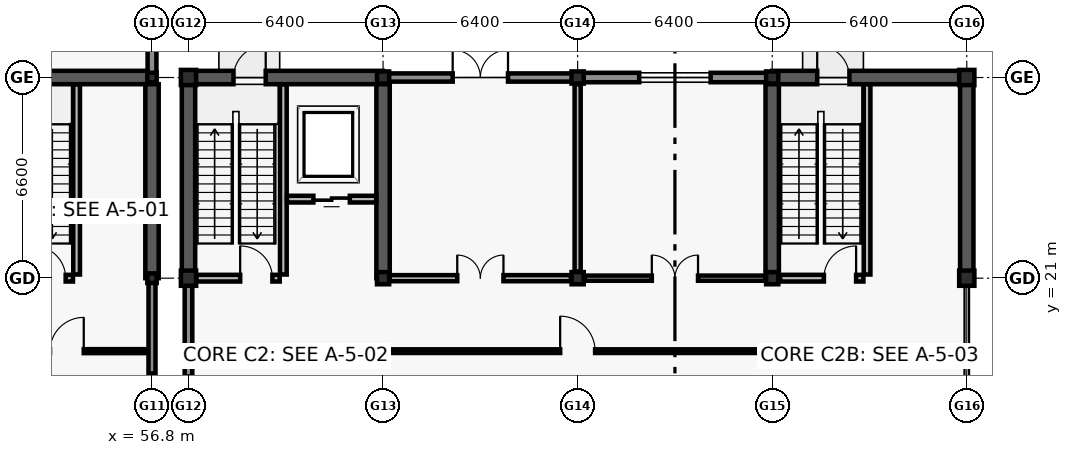
"""IFC4 building model, lengths in metres.
Left out: names, types, materials, properties, quantities, classifications, styles, units other than length and angle.
Written with IfcOpenShell. Run it as: python <this file> out.ifc"""

import sys

from ifc_helpers import new_model, si_unit, direction, frame, frame_2d, origin, origin_2d, place, context, subcontext, project, spatial, rectangle, i_section, extrude, element, fill, save


model = new_model("IFC4")
c1 = context("Model", 3, precision=1e-05, world=origin(), true_north=direction((0.0, 1.0)))
c2 = subcontext(c1, "Body", "Model", "MODEL_VIEW")
j1 = project(units=[si_unit("LENGTHUNIT", "METRE"), si_unit("PLANEANGLEUNIT", "RADIAN")], contexts=[c1])
p1 = place(None, origin())
s1 = spatial("IfcSite", under=j1, at=p1, CompositionType="ELEMENT")
p2 = place(p1, origin())
s2 = spatial("IfcBuilding", under=s1, at=p2, CompositionType="ELEMENT")
p3 = place(p2, origin())
s3 = spatial("IfcBuildingStorey", under=s2, at=p3, CompositionType="ELEMENT", Elevation=0.0)
for number, where, z_axis, x_axis in (
    (1, (56.8, 21.0, 0.0), (0.0, 0.0, 1.0), (1.0, 0.0, 0.0)),
    (2, (56.8, 27.6, 0.0), (0.0, 0.0, 1.0), (1.0, 0.0, 0.0)),
):
    element("IfcColumn", number, at=place(p3, frame(where, z_axis=z_axis, x_axis=x_axis)), inside=s3, PredefinedType="COLUMN", context=c2, shape_type="SweptSolid", body=[
        extrude(i_section(OverallWidth=0.307, OverallDepth=0.315, WebThickness=0.012, FlangeThickness=0.019, FilletRadius=0.017, at=origin_2d()), origin(), (0.0, 0.0, 1.0), 5.4),
    ])
for number, where, z_axis, x_axis in (
    (3, (58.0, 21.0, 0.0), (0.0, 0.0, 1.0), (1.0, 0.0, 0.0)),
    (4, (58.0, 27.6, 0.0), (0.0, 0.0, 1.0), (1.0, 0.0, 0.0)),
):
    element("IfcColumn", number, at=place(p3, frame(where, z_axis=z_axis, x_axis=x_axis)), inside=s3, PredefinedType="COLUMN", context=c2, shape_type="SweptSolid", body=[
        extrude(i_section(OverallWidth=0.5, OverallDepth=0.5, WebThickness=0.02, FlangeThickness=0.036, at=origin_2d()), origin(), (0.0, 0.0, 1.0), 5.4),
    ])
for number, where, z_axis, x_axis in (
    (5, (64.4, 21.0, 0.0), (0.0, 0.0, 1.0), (1.0, 0.0, 0.0)),
    (6, (64.4, 27.6, 0.0), (0.0, 0.0, 1.0), (1.0, 0.0, 0.0)),
    (7, (70.8, 21.0, 0.0), (0.0, 0.0, 1.0), (1.0, 0.0, 0.0)),
    (8, (70.8, 27.6, 0.0), (0.0, 0.0, 1.0), (1.0, 0.0, 0.0)),
    (9, (77.2, 21.0, 0.0), (0.0, 0.0, 1.0), (1.0, 0.0, 0.0)),
    (10, (77.2, 27.6, 0.0), (0.0, 0.0, 1.0), (1.0, 0.0, 0.0)),
):
    element("IfcColumn", number, at=place(p3, frame(where, z_axis=z_axis, x_axis=x_axis)), inside=s3, PredefinedType="COLUMN", context=c2, shape_type="SweptSolid", body=[
        extrude(i_section(OverallWidth=0.4, OverallDepth=0.4, WebThickness=0.02, FlangeThickness=0.032, at=origin_2d()), origin(), (0.0, 0.0, 1.0), 5.4),
    ])
for number, where, z_axis, x_axis in (
    (11, (83.6, 21.0, 0.0), (0.0, 0.0, 1.0), (1.0, 0.0, 0.0)),
    (12, (83.6, 27.6, 0.0), (0.0, 0.0, 1.0), (1.0, 0.0, 0.0)),
):
    element("IfcColumn", number, at=place(p3, frame(where, z_axis=z_axis, x_axis=x_axis)), inside=s3, PredefinedType="COLUMN", context=c2, shape_type="SweptSolid", body=[
        extrude(i_section(OverallWidth=0.5, OverallDepth=0.5, WebThickness=0.02, FlangeThickness=0.036, at=origin_2d()), origin(), (0.0, 0.0, 1.0), 5.4),
    ])
p4 = place(p3, frame((51.2, 27.6, 0.0), z_axis=(0.0, 0.0, 1.0), x_axis=(1.0, 0.0, 0.0)))
e13 = element("IfcWall", 13, at=p4, inside=s3, PredefinedType="SHEAR", context=c2, shape_type="SweptSolid", body=[
    extrude(rectangle(XDim=5.6, YDim=0.44, at=frame_2d((2.8, 0.0))), origin(), (0.0, 0.0, 1.0), 5.16),
])
p5 = place(p3, frame((56.8, 21.0, 0.0), z_axis=(0.0, 0.0, 1.0), x_axis=(0.0, 1.0, 0.0)))
e14 = element("IfcWall", 14, at=p5, inside=s3, PredefinedType="SHEAR", context=c2, shape_type="SweptSolid", body=[
    extrude(rectangle(XDim=6.38, YDim=0.44, at=frame_2d((3.19, 0.0))), origin(), (0.0, 0.0, 1.0), 5.16),
])
p6 = place(p3, frame((58.0, 27.6, 0.0), z_axis=(0.0, 0.0, 1.0), x_axis=(1.0, 0.0, 0.0)))
e15 = element("IfcWall", 15, at=p6, inside=s3, PredefinedType="SHEAR", context=c2, shape_type="SweptSolid", body=[
    extrude(rectangle(XDim=6.4, YDim=0.44, at=frame_2d((3.2, 0.0))), origin(), (0.0, 0.0, 1.0), 5.16),
])
p7 = place(p6, frame((1.48, 0.0, 0.0)))
e16 = element("IfcOpeningElement", 16, at=p7, cuts=e15, PredefinedType="OPENING", context=c2, shape_type="SweptSolid", body=[
    extrude(rectangle(XDim=1.06, YDim=2.12, at=frame_2d((0.53, 1.06))), frame((0.0, 0.23, 0.0), z_axis=(0.0, -1.0, 0.0), x_axis=(1.0, 0.0, 0.0)), (0.0, 0.0, 1.0), 0.46),
])
for number, where, z_axis, x_axis in (
    (17, (58.0, 21.0, 0.0), (0.0, 0.0, 1.0), (0.0, 1.0, 0.0)),
    (18, (64.4, 21.0, 0.0), (0.0, 0.0, 1.0), (0.0, 1.0, 0.0)),
):
    element("IfcWall", number, at=place(p3, frame(where, z_axis=z_axis, x_axis=x_axis)), inside=s3, PredefinedType="SHEAR", context=c2, shape_type="SweptSolid", body=[
        extrude(rectangle(XDim=6.38, YDim=0.44, at=frame_2d((3.19, 0.0))), origin(), (0.0, 0.0, 1.0), 5.16),
    ])
p8 = place(p3, frame((77.2, 27.6, 0.0), z_axis=(0.0, 0.0, 1.0), x_axis=(1.0, 0.0, 0.0)))
e19 = element("IfcWall", 19, at=p8, inside=s3, PredefinedType="SHEAR", context=c2, shape_type="SweptSolid", body=[
    extrude(rectangle(XDim=6.4, YDim=0.44, at=frame_2d((3.2, 0.0))), origin(), (0.0, 0.0, 1.0), 5.16),
])
p9 = place(p8, frame((1.48, 0.0, 0.0)))
e20 = element("IfcOpeningElement", 20, at=p9, cuts=e19, PredefinedType="OPENING", context=c2, shape_type="SweptSolid", body=[
    extrude(rectangle(XDim=1.06, YDim=2.12, at=frame_2d((0.53, 1.06))), frame((0.0, 0.23, 0.0), z_axis=(0.0, -1.0, 0.0), x_axis=(1.0, 0.0, 0.0)), (0.0, 0.0, 1.0), 0.46),
])
for number, where, z_axis, x_axis in (
    (21, (77.2, 21.0, 0.0), (0.0, 0.0, 1.0), (0.0, 1.0, 0.0)),
    (22, (83.6, 21.0, 0.0), (0.0, 0.0, 1.0), (0.0, 1.0, 0.0)),
):
    element("IfcWall", number, at=place(p3, frame(where, z_axis=z_axis, x_axis=x_axis)), inside=s3, PredefinedType="SHEAR", context=c2, shape_type="SweptSolid", body=[
        extrude(rectangle(XDim=6.38, YDim=0.44, at=frame_2d((3.19, 0.0))), origin(), (0.0, 0.0, 1.0), 5.16),
    ])
p10 = place(p3, frame((56.8, 20.995, 0.0), z_axis=(0.0, 0.0, 1.0), x_axis=(0.0, -1.0, 0.0)))
e23 = element("IfcWall", 23, at=p10, inside=s3, PredefinedType="SOLIDWALL", context=c2, shape_type="SweptSolid", body=[
    extrude(rectangle(XDim=6.59, YDim=0.23, at=frame_2d((3.295, 0.0))), origin(), (0.0, 0.0, 1.0), 4.52),
])
p11 = place(p10, frame((3.127, 0.0, 0.8)))
e24 = element("IfcOpeningElement", 24, at=p11, cuts=e23, PredefinedType="OPENING", context=c2, shape_type="SweptSolid", body=[
    extrude(rectangle(XDim=2.7, YDim=2.1, at=frame_2d((1.35, 1.05))), frame((0.0, 0.125, 0.0), z_axis=(0.0, -1.0, 0.0), x_axis=(1.0, 0.0, 0.0)), (0.0, 0.0, 1.0), 0.25),
])
p12 = place(p3, frame((56.8, 34.195, 0.0), z_axis=(0.0, 0.0, 1.0), x_axis=(0.0, -1.0, 0.0)))
e25 = element("IfcWall", 25, at=p12, inside=s3, PredefinedType="SOLIDWALL", context=c2, shape_type="SweptSolid", body=[
    extrude(rectangle(XDim=6.59, YDim=0.29, at=frame_2d((3.295, 0.0))), origin(), (0.0, 0.0, 1.0), 4.52),
])
p13 = place(p12, frame((1.72, 0.0, 0.8)))
e26 = element("IfcOpeningElement", 26, at=p13, cuts=e25, PredefinedType="OPENING", context=c2, shape_type="SweptSolid", body=[
    extrude(rectangle(XDim=3.15, YDim=2.1, at=frame_2d((1.575, 1.05))), frame((0.0, 0.155, 0.0), z_axis=(0.0, -1.0, 0.0), x_axis=(1.0, 0.0, 0.0)), (0.0, 0.0, 1.0), 0.31),
])
p14 = place(p3, frame((64.405, 27.6, 0.0), z_axis=(0.0, 0.0, 1.0), x_axis=(1.0, 0.0, 0.0)))
e27 = element("IfcWall", 27, at=p14, inside=s3, PredefinedType="SOLIDWALL", context=c2, shape_type="SweptSolid", body=[
    extrude(rectangle(XDim=6.39, YDim=0.27, at=frame_2d((3.195, 0.0))), origin(), (0.0, 0.0, 1.0), 4.52),
])
p15 = place(p14, frame((2.285, 0.0, 0.0)))
e28 = element("IfcOpeningElement", 28, at=p15, cuts=e27, PredefinedType="OPENING", context=c2, shape_type="SweptSolid", body=[
    extrude(rectangle(XDim=1.82, YDim=2.2, at=frame_2d((0.91, 1.1))), frame((0.0, 0.145, 0.0), z_axis=(0.0, -1.0, 0.0), x_axis=(1.0, 0.0, 0.0)), (0.0, 0.0, 1.0), 0.29),
])
p16 = place(p3, frame((70.805, 27.6, 0.0), z_axis=(0.0, 0.0, 1.0), x_axis=(1.0, 0.0, 0.0)))
e29 = element("IfcWall", 29, at=p16, inside=s3, PredefinedType="SOLIDWALL", context=c2, shape_type="SweptSolid", body=[
    extrude(rectangle(XDim=6.39, YDim=0.31, at=frame_2d((3.195, 0.0))), origin(), (0.0, 0.0, 1.0), 4.52),
])
p17 = place(p16, frame((2.02, 0.0, 0.8)))
e30 = element("IfcOpeningElement", 30, at=p17, cuts=e29, PredefinedType="OPENING", context=c2, shape_type="SweptSolid", body=[
    extrude(rectangle(XDim=2.35, YDim=1.8, at=frame_2d((1.175, 0.9))), frame((0.0, 0.165, 0.0), z_axis=(0.0, -1.0, 0.0), x_axis=(1.0, 0.0, 0.0)), (0.0, 0.0, 1.0), 0.33),
])
p18 = place(p3, frame((58.0, 14.405, 0.0), z_axis=(0.0, 0.0, 1.0), x_axis=(0.0, 1.0, 0.0)))
e31 = element("IfcWall", 31, at=p18, inside=s3, PredefinedType="SOLIDWALL", context=c2, shape_type="SweptSolid", body=[
    extrude(rectangle(XDim=6.59, YDim=0.25, at=frame_2d((3.295, 0.0))), origin(), (0.0, 0.0, 1.0), 4.52),
])
p19 = place(p18, frame((0.863, 0.0, 0.8)))
e32 = element("IfcOpeningElement", 32, at=p19, cuts=e31, PredefinedType="OPENING", context=c2, shape_type="SweptSolid", body=[
    extrude(rectangle(XDim=2.5, YDim=1.8, at=frame_2d((1.25, 0.9))), frame((0.0, 0.135, 0.0), z_axis=(0.0, -1.0, 0.0), x_axis=(1.0, 0.0, 0.0)), (0.0, 0.0, 1.0), 0.27),
])
p20 = place(p3, frame((54.32, 21.12, 0.0), z_axis=(0.0, 0.0, 1.0), x_axis=(0.0, 1.0, 0.0)))
e33 = element("IfcWall", 33, at=p20, inside=s3, PredefinedType="SOLIDWALL", context=c2, shape_type="SweptSolid", body=[
    extrude(rectangle(XDim=6.255, YDim=0.22, at=frame_2d((3.127, 0.0))), origin(), (0.0, 0.0, 1.0), 5.16),
])
p21 = place(p3, frame((51.46, 21.0, 0.0), z_axis=(0.0, 0.0, 1.0), x_axis=(1.0, 0.0, 0.0)))
e34 = element("IfcWall", 34, at=p21, inside=s3, PredefinedType="SOLIDWALL", context=c2, shape_type="SweptSolid", body=[
    extrude(rectangle(XDim=2.74, YDim=0.22, at=frame_2d((1.37, 0.0))), origin(), (0.0, 0.0, 1.0), 4.52),
])
p22 = place(p21, frame((1.44, 0.0, 0.0)))
e35 = element("IfcOpeningElement", 35, at=p22, cuts=e34, PredefinedType="OPENING", context=c2, shape_type="SweptSolid", body=[
    extrude(rectangle(XDim=1.06, YDim=2.1, at=frame_2d((0.53, 1.05))), frame((0.0, 0.12, 0.0), z_axis=(0.0, -1.0, 0.0), x_axis=(1.0, 0.0, 0.0)), (0.0, 0.0, 1.0), 0.24),
])
p23 = place(p3, frame((61.12, 21.12, 0.0), z_axis=(0.0, 0.0, 1.0), x_axis=(0.0, 1.0, 0.0)))
e36 = element("IfcWall", 36, at=p23, inside=s3, PredefinedType="SOLIDWALL", context=c2, shape_type="SweptSolid", body=[
    extrude(rectangle(XDim=6.255, YDim=0.22, at=frame_2d((3.127, 0.0))), origin(), (0.0, 0.0, 1.0), 5.16),
])
p24 = place(p3, frame((58.26, 21.0, 0.0), z_axis=(0.0, 0.0, 1.0), x_axis=(1.0, 0.0, 0.0)))
e37 = element("IfcWall", 37, at=p24, inside=s3, PredefinedType="SOLIDWALL", context=c2, shape_type="SweptSolid", body=[
    extrude(rectangle(XDim=2.74, YDim=0.22, at=frame_2d((1.37, 0.0))), origin(), (0.0, 0.0, 1.0), 4.52),
])
p25 = place(p24, frame((1.44, 0.0, 0.0)))
e38 = element("IfcOpeningElement", 38, at=p25, cuts=e37, PredefinedType="OPENING", context=c2, shape_type="SweptSolid", body=[
    extrude(rectangle(XDim=1.06, YDim=2.1, at=frame_2d((0.53, 1.05))), frame((0.0, 0.12, 0.0), z_axis=(0.0, -1.0, 0.0), x_axis=(1.0, 0.0, 0.0)), (0.0, 0.0, 1.0), 0.24),
])
p26 = place(p3, frame((61.24, 23.6, 0.0), z_axis=(0.0, 0.0, 1.0), x_axis=(1.0, 0.0, 0.0)))
e39 = element("IfcWall", 39, at=p26, inside=s3, PredefinedType="SOLIDWALL", context=c2, shape_type="SweptSolid", body=[
    extrude(rectangle(XDim=2.935, YDim=0.22, at=frame_2d((1.468, 0.0))), origin(), (0.0, 0.0, 1.0), 5.16),
])
p27 = place(p26, frame((0.867, 0.0, 0.0)))
e40 = element("IfcOpeningElement", 40, at=p27, cuts=e39, PredefinedType="OPENING", context=c2, shape_type="SweptSolid", body=[
    extrude(rectangle(XDim=1.2, YDim=2.15, at=frame_2d((0.6, 1.075))), frame((0.0, 0.12, 0.0), z_axis=(0.0, -1.0, 0.0), x_axis=(1.0, 0.0, 0.0)), (0.0, 0.0, 1.0), 0.24),
])
p28 = place(p3, frame((80.32, 21.12, 0.0), z_axis=(0.0, 0.0, 1.0), x_axis=(0.0, 1.0, 0.0)))
e41 = element("IfcWall", 41, at=p28, inside=s3, PredefinedType="SOLIDWALL", context=c2, shape_type="SweptSolid", body=[
    extrude(rectangle(XDim=6.255, YDim=0.22, at=frame_2d((3.127, 0.0))), origin(), (0.0, 0.0, 1.0), 5.16),
])
p29 = place(p3, frame((77.46, 21.0, 0.0), z_axis=(0.0, 0.0, 1.0), x_axis=(1.0, 0.0, 0.0)))
e42 = element("IfcWall", 42, at=p29, inside=s3, PredefinedType="SOLIDWALL", context=c2, shape_type="SweptSolid", body=[
    extrude(rectangle(XDim=2.74, YDim=0.22, at=frame_2d((1.37, 0.0))), origin(), (0.0, 0.0, 1.0), 4.52),
])
p30 = place(p29, frame((1.44, 0.0, 0.0)))
e43 = element("IfcOpeningElement", 43, at=p30, cuts=e42, PredefinedType="OPENING", context=c2, shape_type="SweptSolid", body=[
    extrude(rectangle(XDim=1.06, YDim=2.1, at=frame_2d((0.53, 1.05))), frame((0.0, 0.12, 0.0), z_axis=(0.0, -1.0, 0.0), x_axis=(1.0, 0.0, 0.0)), (0.0, 0.0, 1.0), 0.24),
])
p31 = place(p3, frame((51.42, 18.6, 0.0), z_axis=(0.0, 0.0, 1.0), x_axis=(1.0, 0.0, 0.0)))
e44 = element("IfcWall", 44, at=p31, inside=s3, PredefinedType="PARTITIONING", context=c2, shape_type="SweptSolid", body=[
    extrude(rectangle(XDim=5.16, YDim=0.13, at=frame_2d((2.58, 0.0))), origin(), (0.0, 0.0, 1.0), 4.5),
])
p32 = place(p31, frame((2.025, 0.0, 0.0)))
e45 = element("IfcOpeningElement", 45, at=p32, cuts=e44, PredefinedType="OPENING", context=c2, shape_type="SweptSolid", body=[
    extrude(rectangle(XDim=1.11, YDim=2.1, at=frame_2d((0.555, 1.05))), frame((0.0, 0.075, 0.0), z_axis=(0.0, -1.0, 0.0), x_axis=(1.0, 0.0, 0.0)), (0.0, 0.0, 1.0), 0.15),
])
p33 = place(p3, frame((58.22, 18.6, 0.0), z_axis=(0.0, 0.0, 1.0), x_axis=(1.0, 0.0, 0.0)))
e46 = element("IfcWall", 46, at=p33, inside=s3, PredefinedType="PARTITIONING", context=c2, shape_type="SweptSolid", body=[
    extrude(rectangle(XDim=25.16, YDim=0.12, at=frame_2d((12.58, 0.0))), origin(), (0.0, 0.0, 1.0), 4.5),
])
p34 = place(p33, frame((12.005, 0.0, 0.0)))
e47 = element("IfcOpeningElement", 47, at=p34, cuts=e46, PredefinedType="OPENING", context=c2, shape_type="SweptSolid", body=[
    extrude(rectangle(XDim=1.15, YDim=2.12, at=frame_2d((0.575, 1.06))), frame((0.0, 0.07, 0.0), z_axis=(0.0, -1.0, 0.0), x_axis=(1.0, 0.0, 0.0)), (0.0, 0.0, 1.0), 0.14),
])
p35 = place(p3, frame((64.62, 21.0, 0.0), z_axis=(0.0, 0.0, 1.0), x_axis=(1.0, 0.0, 0.0)))
e48 = element("IfcWall", 48, at=p35, inside=s3, PredefinedType="PARTITIONING", context=c2, shape_type="SweptSolid", body=[
    extrude(rectangle(XDim=5.96, YDim=0.2, at=frame_2d((2.98, 0.0))), origin(), (0.0, 0.0, 1.0), 4.5),
])
p36 = place(p35, frame((2.22, 0.0, 0.0)))
e49 = element("IfcOpeningElement", 49, at=p36, cuts=e48, PredefinedType="OPENING", context=c2, shape_type="SweptSolid", body=[
    extrude(rectangle(XDim=1.52, YDim=2.15, at=frame_2d((0.76, 1.075))), frame((0.0, 0.11, 0.0), z_axis=(0.0, -1.0, 0.0), x_axis=(1.0, 0.0, 0.0)), (0.0, 0.0, 1.0), 0.22),
])
p37 = place(p3, frame((71.02, 21.0, 0.0), z_axis=(0.0, 0.0, 1.0), x_axis=(1.0, 0.0, 0.0)))
e50 = element("IfcWall", 50, at=p37, inside=s3, PredefinedType="PARTITIONING", context=c2, shape_type="SweptSolid", body=[
    extrude(rectangle(XDim=5.96, YDim=0.17, at=frame_2d((2.98, 0.0))), origin(), (0.0, 0.0, 1.0), 4.5),
])
p38 = place(p37, frame((2.22, 0.0, 0.0)))
e51 = element("IfcOpeningElement", 51, at=p38, cuts=e50, PredefinedType="OPENING", context=c2, shape_type="SweptSolid", body=[
    extrude(rectangle(XDim=1.52, YDim=2.15, at=frame_2d((0.76, 1.075))), frame((0.0, 0.095, 0.0), z_axis=(0.0, -1.0, 0.0), x_axis=(1.0, 0.0, 0.0)), (0.0, 0.0, 1.0), 0.19),
])
p39 = place(p3, frame((70.8, 21.22, 0.0), z_axis=(0.0, 0.0, 1.0), x_axis=(0.0, 1.0, 0.0)))
e52 = element("IfcWall", 52, at=p39, inside=s3, PredefinedType="PARTITIONING", context=c2, shape_type="SweptSolid", body=[
    extrude(rectangle(XDim=6.16, YDim=0.2, at=frame_2d((3.08, 0.0))), origin(), (0.0, 0.0, 1.0), 4.5),
])
p40 = place(p11, origin())
e53 = element("IfcWindow", 53, at=p40, inside=s3, PartitioningType="TRIPLE_PANEL_VERTICAL", PredefinedType="WINDOW", context=c2, shape_type="SweptSolid", body=[
    extrude(rectangle(XDim=2.7, YDim=2.1, at=frame_2d((1.35, 1.05))), frame((0.0, 0.03, 0.0), z_axis=(0.0, -1.0, 0.0), x_axis=(1.0, 0.0, 0.0)), (0.0, 0.0, 1.0), 0.06),
])
fill(e24, e53)
p41 = place(p15, origin())
e54 = element("IfcDoor", 54, at=p41, inside=s3, OperationType="DOUBLE_DOOR_SINGLE_SWING", PredefinedType="DOOR", context=c2, shape_type="SweptSolid", body=[
    extrude(rectangle(XDim=1.82, YDim=2.2, at=frame_2d((0.91, 1.1))), frame((0.0, 0.025, 0.0), z_axis=(0.0, -1.0, 0.0), x_axis=(1.0, 0.0, 0.0)), (0.0, 0.0, 1.0), 0.05),
])
fill(e28, e54)
p42 = place(p17, origin())
e55 = element("IfcWindow", 55, at=p42, inside=s3, PartitioningType="DOUBLE_PANEL_VERTICAL", PredefinedType="WINDOW", context=c2, shape_type="SweptSolid", body=[
    extrude(rectangle(XDim=2.35, YDim=1.8, at=frame_2d((1.175, 0.9))), frame((0.0, 0.03, 0.0), z_axis=(0.0, -1.0, 0.0), x_axis=(1.0, 0.0, 0.0)), (0.0, 0.0, 1.0), 0.06),
])
fill(e30, e55)
p43 = place(p22, origin())
e56 = element("IfcDoor", 56, at=p43, inside=s3, OperationType="SINGLE_SWING_LEFT", PredefinedType="DOOR", context=c2, shape_type="SweptSolid", body=[
    extrude(rectangle(XDim=1.06, YDim=2.1, at=frame_2d((0.53, 1.05))), frame((0.0, 0.025, 0.0), z_axis=(0.0, -1.0, 0.0), x_axis=(1.0, 0.0, 0.0)), (0.0, 0.0, 1.0), 0.05),
])
fill(e35, e56)
p44 = place(p25, origin())
e57 = element("IfcDoor", 57, at=p44, inside=s3, OperationType="SINGLE_SWING_LEFT", PredefinedType="DOOR", context=c2, shape_type="SweptSolid", body=[
    extrude(rectangle(XDim=1.06, YDim=2.1, at=frame_2d((0.53, 1.05))), frame((0.0, 0.025, 0.0), z_axis=(0.0, -1.0, 0.0), x_axis=(1.0, 0.0, 0.0)), (0.0, 0.0, 1.0), 0.05),
])
fill(e38, e57)
p45 = place(p7, origin())
e58 = element("IfcDoor", 58, at=p45, inside=s3, OperationType="SINGLE_SWING_RIGHT", PredefinedType="DOOR", context=c2, shape_type="SweptSolid", body=[
    extrude(rectangle(XDim=1.06, YDim=2.12, at=frame_2d((0.53, 1.06))), frame((0.0, 0.025, 0.0), z_axis=(0.0, -1.0, 0.0), x_axis=(1.0, 0.0, 0.0)), (0.0, 0.0, 1.0), 0.05),
])
fill(e16, e58)
p46 = place(p27, origin())
e59 = element("IfcDoor", 59, at=p46, inside=s3, OperationType="DOUBLE_DOOR_SLIDING", PredefinedType="DOOR", context=c2, shape_type="SweptSolid", body=[
    extrude(rectangle(XDim=1.2, YDim=2.15, at=frame_2d((0.6, 1.075))), frame((0.0, 0.025, 0.0), z_axis=(0.0, -1.0, 0.0), x_axis=(1.0, 0.0, 0.0)), (0.0, 0.0, 1.0), 0.05),
])
fill(e40, e59)
p47 = place(p30, origin())
e60 = element("IfcDoor", 60, at=p47, inside=s3, OperationType="SINGLE_SWING_RIGHT", PredefinedType="DOOR", context=c2, shape_type="SweptSolid", body=[
    extrude(rectangle(XDim=1.06, YDim=2.1, at=frame_2d((0.53, 1.05))), frame((0.0, 0.025, 0.0), z_axis=(0.0, -1.0, 0.0), x_axis=(1.0, 0.0, 0.0)), (0.0, 0.0, 1.0), 0.05),
])
fill(e43, e60)
p48 = place(p9, origin())
e61 = element("IfcDoor", 61, at=p48, inside=s3, OperationType="SINGLE_SWING_LEFT", PredefinedType="DOOR", context=c2, shape_type="SweptSolid", body=[
    extrude(rectangle(XDim=1.06, YDim=2.12, at=frame_2d((0.53, 1.06))), frame((0.0, 0.025, 0.0), z_axis=(0.0, -1.0, 0.0), x_axis=(1.0, 0.0, 0.0)), (0.0, 0.0, 1.0), 0.05),
])
fill(e20, e61)
p49 = place(p32, origin())
e62 = element("IfcDoor", 62, at=p49, inside=s3, OperationType="SINGLE_SWING_RIGHT", PredefinedType="DOOR", context=c2, shape_type="SweptSolid", body=[
    extrude(rectangle(XDim=1.11, YDim=2.1, at=frame_2d((0.555, 1.05))), frame((0.0, 0.025, 0.0), z_axis=(0.0, -1.0, 0.0), x_axis=(1.0, 0.0, 0.0)), (0.0, 0.0, 1.0), 0.05),
])
fill(e45, e62)
p50 = place(p34, origin())
e63 = element("IfcDoor", 63, at=p50, inside=s3, OperationType="SINGLE_SWING_LEFT", PredefinedType="DOOR", context=c2, shape_type="SweptSolid", body=[
    extrude(rectangle(XDim=1.15, YDim=2.12, at=frame_2d((0.575, 1.06))), frame((0.0, 0.025, 0.0), z_axis=(0.0, -1.0, 0.0), x_axis=(1.0, 0.0, 0.0)), (0.0, 0.0, 1.0), 0.05),
])
fill(e47, e63)
p51 = place(p36, origin())
e64 = element("IfcDoor", 64, at=p51, inside=s3, OperationType="DOUBLE_DOOR_SINGLE_SWING", PredefinedType="DOOR", context=c2, shape_type="SweptSolid", body=[
    extrude(rectangle(XDim=1.52, YDim=2.15, at=frame_2d((0.76, 1.075))), frame((0.0, 0.025, 0.0), z_axis=(0.0, -1.0, 0.0), x_axis=(1.0, 0.0, 0.0)), (0.0, 0.0, 1.0), 0.05),
])
fill(e49, e64)
p52 = place(p38, origin())
e65 = element("IfcDoor", 65, at=p52, inside=s3, OperationType="DOUBLE_DOOR_SINGLE_SWING", PredefinedType="DOOR", context=c2, shape_type="SweptSolid", body=[
    extrude(rectangle(XDim=1.52, YDim=2.15, at=frame_2d((0.76, 1.075))), frame((0.0, 0.025, 0.0), z_axis=(0.0, -1.0, 0.0), x_axis=(1.0, 0.0, 0.0)), (0.0, 0.0, 1.0), 0.05),
])
fill(e51, e65)
save(model, sys.argv[1])
